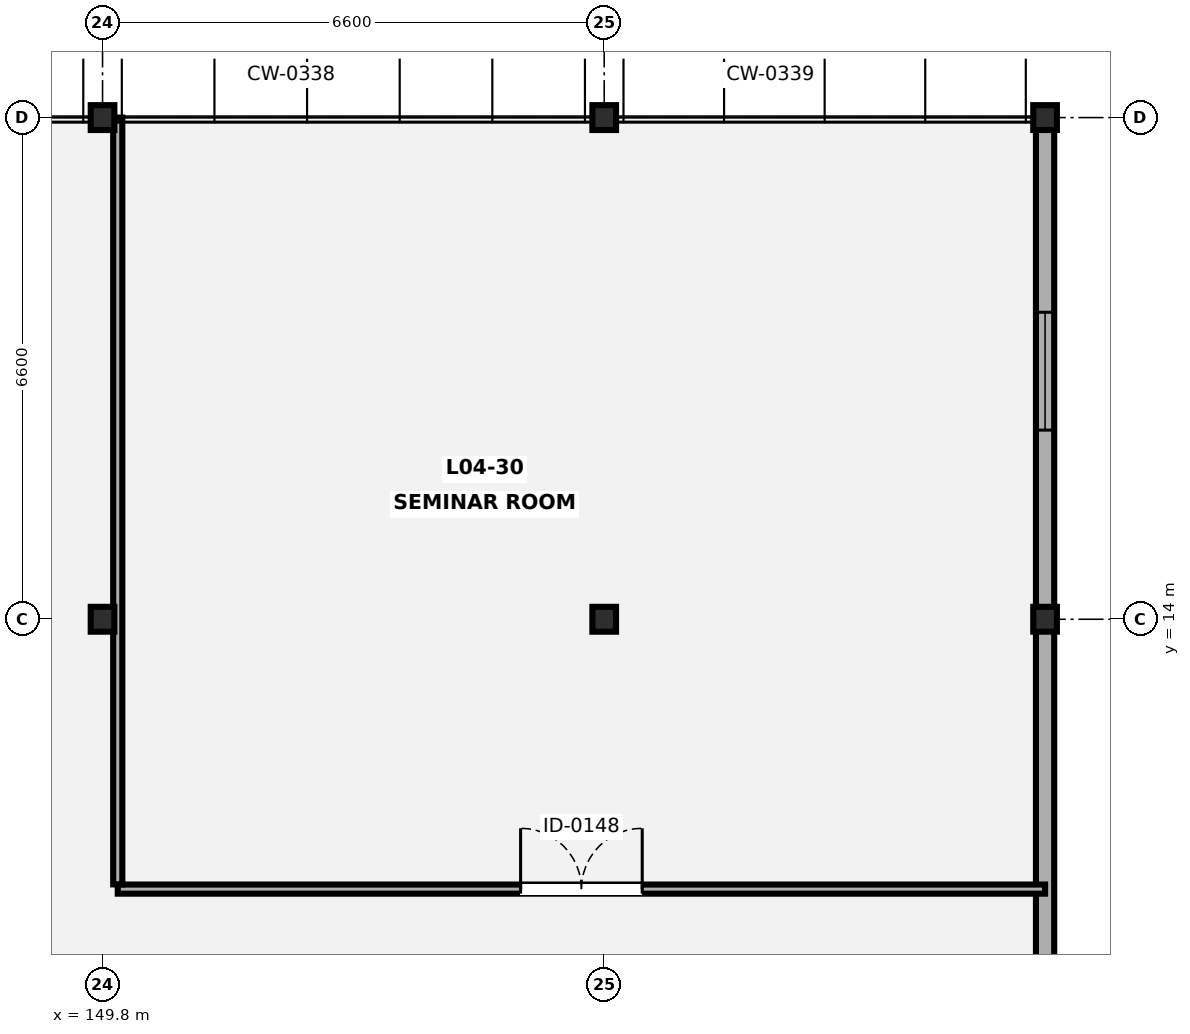
"""IFC4 building model, lengths in metres.
Left out: names, types, materials, properties, quantities, classifications, styles, units other than length and angle.
Written with IfcOpenShell. Run it as: python <this file> out.ifc"""

import sys

from ifc_helpers import new_model, si_unit, direction, frame, frame_2d, origin, origin_2d, place, context, subcontext, project, spatial, rectangle, i_section, extrude, element, fill, save


model = new_model("IFC4")
c1 = context("Model", 3, precision=1e-05, world=origin(), true_north=direction((0.0, 1.0)))
c2 = subcontext(c1, "Body", "Model", "MODEL_VIEW")
j1 = project(units=[si_unit("LENGTHUNIT", "METRE"), si_unit("PLANEANGLEUNIT", "RADIAN")], contexts=[c1])
p1 = place(None, origin())
s1 = spatial("IfcSite", under=j1, at=p1, CompositionType="ELEMENT")
p2 = place(p1, origin())
s2 = spatial("IfcBuilding", under=s1, at=p2, CompositionType="ELEMENT")
p3 = place(p2, frame((0.0, 0.0, 17.5)))
s3 = spatial("IfcBuildingStorey", under=s2, at=p3, CompositionType="ELEMENT", Elevation=17.5)
for number, where, z_axis, x_axis in (
    (1, (149.8, 14.0, 0.0), (0.0, 0.0, 1.0), (1.0, 0.0, 0.0)),
    (2, (149.8, 20.6, 0.0), (0.0, 0.0, 1.0), (1.0, 0.0, 0.0)),
    (3, (156.4, 14.0, 0.0), (0.0, 0.0, 1.0), (1.0, 0.0, 0.0)),
    (4, (156.4, 20.6, 0.0), (0.0, 0.0, 1.0), (1.0, 0.0, 0.0)),
    (5, (162.2, 14.0, 0.0), (0.0, 0.0, 1.0), (1.0, 0.0, 0.0)),
    (6, (162.2, 20.6, 0.0), (0.0, 0.0, 1.0), (1.0, 0.0, 0.0)),
):
    element("IfcColumn", number, at=place(p3, frame(where, z_axis=z_axis, x_axis=x_axis)), inside=s3, PredefinedType="COLUMN", context=c2, shape_type="SweptSolid", body=[
        extrude(i_section(OverallWidth=0.311, OverallDepth=0.327, WebThickness=0.016, FlangeThickness=0.025, FilletRadius=0.017, at=origin_2d()), origin(), (0.0, 0.0, 1.0), 4.2),
    ])
p4 = place(p3, frame((162.2, 20.438, 0.0), z_axis=(0.0, 0.0, 1.0), x_axis=(0.0, -1.0, 0.0)))
e7 = element("IfcWall", 7, at=p4, inside=s3, PredefinedType="SOLIDWALL", context=c2, shape_type="SweptSolid", body=[
    extrude(rectangle(XDim=19.477, YDim=0.24, at=frame_2d((9.739, 0.0))), origin(), (0.0, 0.0, 1.0), 3.372),
])
p5 = place(p4, frame((2.4, 0.0, 0.85)))
e8 = element("IfcOpeningElement", 8, at=p5, cuts=e7, PredefinedType="OPENING", context=c2, shape_type="SweptSolid", body=[
    extrude(rectangle(XDim=1.55, YDim=1.4, at=frame_2d((0.775, 0.7))), frame((0.0, 0.13, 0.0), z_axis=(0.0, -1.0, 0.0), x_axis=(1.0, 0.0, 0.0)), (0.0, 0.0, 1.0), 0.26),
])
p6 = place(p4, frame((15.1, 0.0, 0.85)))
e9 = element("IfcOpeningElement", 9, at=p6, cuts=e7, PredefinedType="OPENING", context=c2, shape_type="SweptSolid", body=[
    extrude(rectangle(XDim=1.95, YDim=1.5, at=frame_2d((0.975, 0.75))), frame((0.0, 0.13, 0.0), z_axis=(0.0, -1.0, 0.0), x_axis=(1.0, 0.0, 0.0)), (0.0, 0.0, 1.0), 0.26),
])
p7 = place(p3, frame((150.0, 10.45, 0.0), z_axis=(0.0, 0.0, 1.0), x_axis=(1.0, 0.0, 0.0)))
e10 = element("IfcWall", 10, at=p7, inside=s3, PredefinedType="PARTITIONING", context=c2, shape_type="SweptSolid", body=[
    extrude(rectangle(XDim=12.2, YDim=0.12, at=frame_2d((6.1, 0.0))), origin(), (0.0, 0.0, 1.0), 3.546),
])
p8 = place(p7, frame((5.3, 0.0, 0.0)))
e11 = element("IfcOpeningElement", 11, at=p8, cuts=e10, PredefinedType="OPENING", context=c2, shape_type="SweptSolid", body=[
    extrude(rectangle(XDim=1.6, YDim=2.18, at=frame_2d((0.8, 1.09))), frame((0.0, 0.07, 0.0), z_axis=(0.0, -1.0, 0.0), x_axis=(1.0, 0.0, 0.0)), (0.0, 0.0, 1.0), 0.14),
])
p9 = place(p3, frame((150.0, 10.512, 0.0), z_axis=(0.0, 0.0, 1.0), x_axis=(0.0, 1.0, 0.0)))
e12 = element("IfcWall", 12, at=p9, inside=s3, PredefinedType="PARTITIONING", context=c2, shape_type="SweptSolid", body=[
    extrude(rectangle(XDim=10.088, YDim=0.12, at=frame_2d((5.044, 0.0))), origin(), (0.0, 0.0, 1.0), 3.372),
])
p10 = place(p5, origin())
e13 = element("IfcWindow", 13, at=p10, inside=s3, PartitioningType="SINGLE_PANEL", PredefinedType="WINDOW", context=c2, shape_type="SweptSolid", body=[
    extrude(rectangle(XDim=1.55, YDim=1.4, at=frame_2d((0.775, 0.7))), frame((0.0, 0.03, 0.0), z_axis=(0.0, -1.0, 0.0), x_axis=(1.0, 0.0, 0.0)), (0.0, 0.0, 1.0), 0.06),
])
fill(e8, e13)
p11 = place(p8, origin())
e14 = element("IfcDoor", 14, at=p11, inside=s3, OperationType="DOUBLE_DOOR_SINGLE_SWING", PredefinedType="DOOR", context=c2, shape_type="SweptSolid", body=[
    extrude(rectangle(XDim=1.6, YDim=2.18, at=frame_2d((0.8, 1.09))), frame((0.0, 0.025, 0.0), z_axis=(0.0, -1.0, 0.0), x_axis=(1.0, 0.0, 0.0)), (0.0, 0.0, 1.0), 0.05),
])
fill(e11, e14)
save(model, sys.argv[1])
